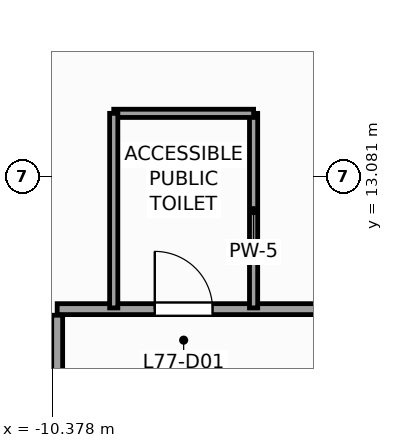
"""IFC4 building model, lengths in metres.
Left out: names, types, materials, properties, quantities, classifications, styles, units other than length and angle.
Written with IfcOpenShell. Run it as: python <this file> out.ifc"""

import sys

from ifc_helpers import new_model, si_unit, direction, frame, frame_2d, origin, place, context, subcontext, project, spatial, rectangle, extrude, source, transform, mapped, element, fill, save


model = new_model("IFC4")
c1 = context("Model", 3, precision=1e-05, world=origin(), true_north=direction((0.0, 1.0)))
c2 = subcontext(c1, "Body", "Model", "MODEL_VIEW")
j1 = project(units=[si_unit("LENGTHUNIT", "METRE"), si_unit("PLANEANGLEUNIT", "RADIAN")], contexts=[c1])
p1 = place(None, origin())
s1 = spatial("IfcSite", under=j1, at=p1, CompositionType="ELEMENT")
p2 = place(p1, origin())
s2 = spatial("IfcBuilding", under=s1, at=p2, CompositionType="ELEMENT")
p3 = place(p2, frame((0.0, 0.0, 312.0)))
s3 = spatial("IfcBuildingStorey", under=s2, at=p3, CompositionType="ELEMENT", Elevation=312.0)
p4 = place(p3, frame((-10.3, 10.9, 0.0), z_axis=(0.0, 0.0, 1.0), x_axis=(1.0, 0.0, 0.0)))
e1 = element("IfcWall", 1, at=p4, inside=s3, PredefinedType="PARTITIONING", context=c2, shape_type="SweptSolid", body=[
    extrude(rectangle(XDim=21.2, YDim=0.18, at=frame_2d((10.6, 0.0))), origin(), (0.0, 0.0, 1.0), 4.55),
])
p5 = place(p4, frame((1.605, 0.0, 0.0)))
e2 = element("IfcOpeningElement", 2, at=p5, cuts=e1, PredefinedType="OPENING", context=c2, shape_type="SweptSolid", body=[
    extrude(rectangle(XDim=0.95, YDim=2.1, at=frame_2d((0.475, 1.05))), frame((0.0, 0.1, 0.0), z_axis=(0.0, -1.0, 0.0), x_axis=(1.0, 0.0, 0.0)), (0.0, 0.0, 1.0), 0.2),
])
p6 = place(p4, frame((7.409, 0.0, 0.0)))
e3 = element("IfcOpeningElement", 3, at=p6, cuts=e1, PredefinedType="OPENING", context=c2, shape_type="SweptSolid", body=[
    extrude(rectangle(XDim=1.1, YDim=2.2, at=frame_2d((0.55, 1.1))), frame((0.0, 0.1, 0.0), z_axis=(0.0, -1.0, 0.0), x_axis=(1.0, 0.0, 0.0)), (0.0, 0.0, 1.0), 0.2),
])
p7 = place(p4, frame((16.236, 0.0, 0.0)))
e4 = element("IfcOpeningElement", 4, at=p7, cuts=e1, PredefinedType="OPENING", context=c2, shape_type="SweptSolid", body=[
    extrude(rectangle(XDim=1.1, YDim=2.2, at=frame_2d((0.55, 1.1))), frame((0.0, 0.1, 0.0), z_axis=(0.0, -1.0, 0.0), x_axis=(1.0, 0.0, 0.0)), (0.0, 0.0, 1.0), 0.2),
])
p8 = place(p3, frame((-10.3, -10.2, 0.0), z_axis=(0.0, 0.0, 1.0), x_axis=(0.0, 1.0, 0.0)))
e5 = element("IfcWall", 5, at=p8, inside=s3, PredefinedType="PARTITIONING", context=c2, shape_type="SweptSolid", body=[
    extrude(rectangle(XDim=21.0, YDim=0.18, at=frame_2d((10.5, 0.0))), origin(), (0.0, 0.0, 1.0), 4.55),
])
p9 = place(p8, frame((6.8, 0.0, 0.0)))
e6 = element("IfcOpeningElement", 6, at=p9, cuts=e5, PredefinedType="OPENING", context=c2, shape_type="SweptSolid", body=[
    extrude(rectangle(XDim=1.1, YDim=2.2, at=frame_2d((0.55, 1.1))), frame((0.0, 0.1, 0.0), z_axis=(0.0, -1.0, 0.0), x_axis=(1.0, 0.0, 0.0)), (0.0, 0.0, 1.0), 0.2),
])
p10 = place(p3, frame((-7.07, 10.92, 0.0), z_axis=(0.0, 0.0, 1.0), x_axis=(0.0, 1.0, 0.0)))
e7 = element("IfcWall", 7, at=p10, inside=s3, PredefinedType="PARTITIONING", context=c2, shape_type="SweptSolid", body=[
    extrude(rectangle(XDim=3.2, YDim=0.135, at=frame_2d((1.6, 0.0))), origin(), (0.0, 0.0, 1.0), 4.55),
])
p11 = place(p3, frame((-9.37, 14.12, 0.0), z_axis=(0.0, 0.0, 1.0), x_axis=(1.0, 0.0, 0.0)))
e8 = element("IfcWall", 8, at=p11, inside=s3, PredefinedType="PARTITIONING", context=c2, shape_type="SweptSolid", body=[
    extrude(rectangle(XDim=2.3, YDim=0.135, at=frame_2d((1.15, 0.0))), origin(), (0.0, 0.0, 1.0), 4.55),
])
p12 = place(p3, frame((-9.37, 10.92, 0.0), z_axis=(0.0, 0.0, 1.0), x_axis=(0.0, 1.0, 0.0)))
e9 = element("IfcWall", 9, at=p12, inside=s3, PredefinedType="PARTITIONING", context=c2, shape_type="SweptSolid", body=[
    extrude(rectangle(XDim=3.2, YDim=0.135, at=frame_2d((1.6, 0.0))), origin(), (0.0, 0.0, 1.0), 4.55),
])
m1 = source(origin(), c2, "Body", "SweptSolid", [
    extrude(rectangle(XDim=0.95, YDim=2.1, at=frame_2d((0.475, 1.05))), frame((0.0, 0.025, 0.0), z_axis=(0.0, -1.0, 0.0), x_axis=(1.0, 0.0, 0.0)), (0.0, 0.0, 1.0), 0.05),
])
p13 = place(p5, origin())
e10 = element("IfcDoor", 10, at=p13, inside=s3, OperationType="SINGLE_SWING_LEFT", PredefinedType="DOOR", context=c2, shape_type="MappedRepresentation", body=[
    mapped(m1, transform((0.0, 0.0, 0.0), scale=1.0)),
])
fill(e2, e10)
save(model, sys.argv[1])
